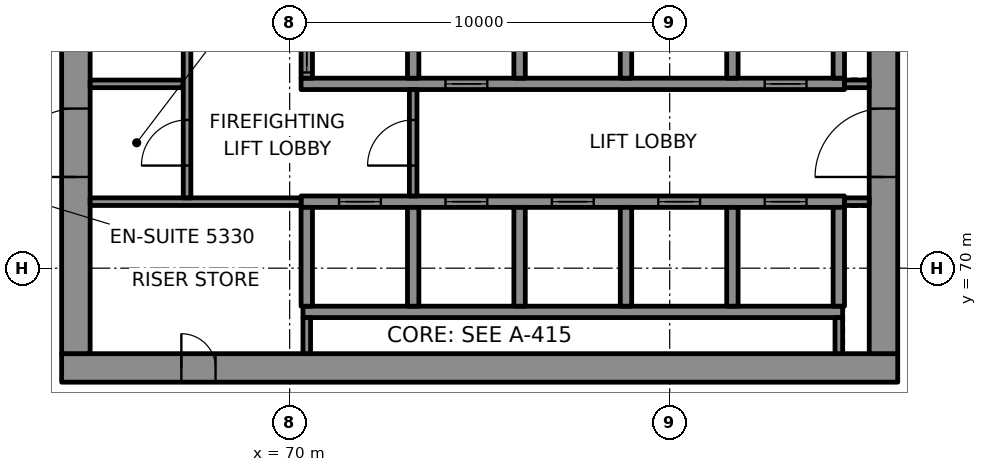
"""IFC4 building model, lengths in metres.
Left out: names, types, materials, properties, quantities, classifications, styles, units other than length and angle.
Written with IfcOpenShell. Run it as: python <this file> out.ifc"""

import sys

from ifc_helpers import new_model, si_unit, direction, frame, frame_2d, origin, place, context, subcontext, project, spatial, rectangle, extrude, element, fill, save


model = new_model("IFC4")
c1 = context("Model", 3, precision=1e-05, world=origin(), true_north=direction((0.0, 1.0)))
c2 = subcontext(c1, "Body", "Model", "MODEL_VIEW")
j1 = project(units=[si_unit("LENGTHUNIT", "METRE"), si_unit("PLANEANGLEUNIT", "RADIAN")], contexts=[c1])
p1 = place(None, origin())
s1 = spatial("IfcSite", under=j1, at=p1, CompositionType="ELEMENT")
p2 = place(p1, origin())
s2 = spatial("IfcBuilding", under=s1, at=p2, CompositionType="ELEMENT")
p3 = place(p2, frame((0.0, 0.0, 226.0)))
s3 = spatial("IfcBuildingStorey", under=s2, at=p3, CompositionType="ELEMENT", Elevation=226.0)
p4 = place(p3, frame((64.0, 67.375, 0.0), z_axis=(0.0, 0.0, 1.0), x_axis=(1.0, 0.0, 0.0)))
e1 = element("IfcWall", 1, at=p4, inside=s3, PredefinedType="SHEAR", context=c2, shape_type="SweptSolid", body=[
    extrude(rectangle(XDim=22.0, YDim=0.75, at=frame_2d((11.0, 0.0))), origin(), (0.0, 0.0, 1.0), 3.7),
])
p5 = place(p4, frame((3.15, 0.0, 0.0)))
e2 = element("IfcOpeningElement", 2, at=p5, cuts=e1, PredefinedType="OPENING", context=c2, shape_type="SweptSolid", body=[
    extrude(rectangle(XDim=0.9, YDim=2.1, at=frame_2d((0.45, 1.05))), frame((0.0, 0.385, 0.0), z_axis=(0.0, -1.0, 0.0), x_axis=(1.0, 0.0, 0.0)), (0.0, 0.0, 1.0), 0.77),
])
p6 = place(p3, frame((64.375, 67.75, 0.0), z_axis=(0.0, 0.0, 1.0), x_axis=(0.0, 1.0, 0.0)))
e3 = element("IfcWall", 3, at=p6, inside=s3, PredefinedType="SHEAR", context=c2, shape_type="SweptSolid", body=[
    extrude(rectangle(XDim=14.5, YDim=0.75, at=frame_2d((7.25, 0.0))), origin(), (0.0, 0.0, 1.0), 3.7),
])
p7 = place(p6, frame((4.65, 0.0, 0.0)))
e4 = element("IfcOpeningElement", 4, at=p7, cuts=e3, PredefinedType="OPENING", context=c2, shape_type="SweptSolid", body=[
    extrude(rectangle(XDim=1.8, YDim=2.1, at=frame_2d((0.9, 1.05))), frame((0.0, 0.385, 0.0), z_axis=(0.0, -1.0, 0.0), x_axis=(1.0, 0.0, 0.0)), (0.0, 0.0, 1.0), 0.77),
])
p8 = place(p6, frame((8.5, 0.0, 0.0)))
e5 = element("IfcOpeningElement", 5, at=p8, cuts=e3, PredefinedType="OPENING", context=c2, shape_type="SweptSolid", body=[
    extrude(rectangle(XDim=0.9, YDim=2.1, at=frame_2d((0.45, 1.05))), frame((0.0, 0.385, 0.0), z_axis=(0.0, -1.0, 0.0), x_axis=(1.0, 0.0, 0.0)), (0.0, 0.0, 1.0), 0.77),
])
p9 = place(p6, frame((12.2, 0.0, 0.0)))
e6 = element("IfcOpeningElement", 6, at=p9, cuts=e3, PredefinedType="OPENING", context=c2, shape_type="SweptSolid", body=[
    extrude(rectangle(XDim=0.9, YDim=2.1, at=frame_2d((0.45, 1.05))), frame((0.0, 0.385, 0.0), z_axis=(0.0, -1.0, 0.0), x_axis=(1.0, 0.0, 0.0)), (0.0, 0.0, 1.0), 0.77),
])
p10 = place(p3, frame((85.625, 67.75, 0.0), z_axis=(0.0, 0.0, 1.0), x_axis=(0.0, 1.0, 0.0)))
e7 = element("IfcWall", 7, at=p10, inside=s3, PredefinedType="SHEAR", context=c2, shape_type="SweptSolid", body=[
    extrude(rectangle(XDim=14.5, YDim=0.75, at=frame_2d((7.25, 0.0))), origin(), (0.0, 0.0, 1.0), 3.7),
])
p11 = place(p10, frame((4.65, 0.0, 0.0)))
e8 = element("IfcOpeningElement", 8, at=p11, cuts=e7, PredefinedType="OPENING", context=c2, shape_type="SweptSolid", body=[
    extrude(rectangle(XDim=1.8, YDim=2.1, at=frame_2d((0.9, 1.05))), frame((0.0, 0.385, 0.0), z_axis=(0.0, -1.0, 0.0), x_axis=(1.0, 0.0, 0.0)), (0.0, 0.0, 1.0), 0.77),
])
p12 = place(p10, frame((11.8, 0.0, 0.0)))
e9 = element("IfcOpeningElement", 9, at=p12, cuts=e7, PredefinedType="OPENING", context=c2, shape_type="SweptSolid", body=[
    extrude(rectangle(XDim=0.9, YDim=2.1, at=frame_2d((0.45, 1.05))), frame((0.0, 0.385, 0.0), z_axis=(0.0, -1.0, 0.0), x_axis=(1.0, 0.0, 0.0)), (0.0, 0.0, 1.0), 0.77),
])
p13 = place(p3, frame((70.35, 68.85, 0.0), z_axis=(0.0, 0.0, 1.0), x_axis=(1.0, 0.0, 0.0)))
e10 = element("IfcWall", 10, at=p13, inside=s3, PredefinedType="SHEAR", context=c2, shape_type="SweptSolid", body=[
    extrude(rectangle(XDim=14.2, YDim=0.3, at=frame_2d((7.1, 0.0))), origin(), (0.0, 0.0, 1.0), 3.7),
])
p14 = place(p3, frame((70.3, 71.75, 0.0), z_axis=(0.0, 0.0, 1.0), x_axis=(1.0, 0.0, 0.0)))
e11 = element("IfcWall", 11, at=p14, inside=s3, PredefinedType="SHEAR", context=c2, shape_type="SweptSolid", body=[
    extrude(rectangle(XDim=14.3, YDim=0.3, at=frame_2d((7.15, 0.0))), origin(), (0.0, 0.0, 1.0), 3.7),
])
p15 = place(p14, frame((1.0, 0.0, 0.0)))
e12 = element("IfcOpeningElement", 12, at=p15, cuts=e11, PredefinedType="OPENING", context=c2, shape_type="SweptSolid", body=[
    extrude(rectangle(XDim=1.1, YDim=2.1, at=frame_2d((0.55, 1.05))), frame((0.0, 0.16, 0.0), z_axis=(0.0, -1.0, 0.0), x_axis=(1.0, 0.0, 0.0)), (0.0, 0.0, 1.0), 0.32),
])
p16 = place(p14, frame((3.8, 0.0, 0.0)))
e13 = element("IfcOpeningElement", 13, at=p16, cuts=e11, PredefinedType="OPENING", context=c2, shape_type="SweptSolid", body=[
    extrude(rectangle(XDim=1.1, YDim=2.1, at=frame_2d((0.55, 1.05))), frame((0.0, 0.16, 0.0), z_axis=(0.0, -1.0, 0.0), x_axis=(1.0, 0.0, 0.0)), (0.0, 0.0, 1.0), 0.32),
])
p17 = place(p14, frame((6.6, 0.0, 0.0)))
e14 = element("IfcOpeningElement", 14, at=p17, cuts=e11, PredefinedType="OPENING", context=c2, shape_type="SweptSolid", body=[
    extrude(rectangle(XDim=1.1, YDim=2.1, at=frame_2d((0.55, 1.05))), frame((0.0, 0.16, 0.0), z_axis=(0.0, -1.0, 0.0), x_axis=(1.0, 0.0, 0.0)), (0.0, 0.0, 1.0), 0.32),
])
p18 = place(p14, frame((9.4, 0.0, 0.0)))
e15 = element("IfcOpeningElement", 15, at=p18, cuts=e11, PredefinedType="OPENING", context=c2, shape_type="SweptSolid", body=[
    extrude(rectangle(XDim=1.1, YDim=2.1, at=frame_2d((0.55, 1.05))), frame((0.0, 0.16, 0.0), z_axis=(0.0, -1.0, 0.0), x_axis=(1.0, 0.0, 0.0)), (0.0, 0.0, 1.0), 0.32),
])
p19 = place(p14, frame((12.2, 0.0, 0.0)))
e16 = element("IfcOpeningElement", 16, at=p19, cuts=e11, PredefinedType="OPENING", context=c2, shape_type="SweptSolid", body=[
    extrude(rectangle(XDim=1.1, YDim=2.1, at=frame_2d((0.55, 1.05))), frame((0.0, 0.16, 0.0), z_axis=(0.0, -1.0, 0.0), x_axis=(1.0, 0.0, 0.0)), (0.0, 0.0, 1.0), 0.32),
])
p20 = place(p3, frame((70.3, 74.85, 0.0), z_axis=(0.0, 0.0, 1.0), x_axis=(1.0, 0.0, 0.0)))
e17 = element("IfcWall", 17, at=p20, inside=s3, PredefinedType="SHEAR", context=c2, shape_type="SweptSolid", body=[
    extrude(rectangle(XDim=14.3, YDim=0.3, at=frame_2d((7.15, 0.0))), origin(), (0.0, 0.0, 1.0), 3.7),
])
p21 = place(p20, frame((3.8, 0.0, 0.0)))
e18 = element("IfcOpeningElement", 18, at=p21, cuts=e17, PredefinedType="OPENING", context=c2, shape_type="SweptSolid", body=[
    extrude(rectangle(XDim=1.1, YDim=2.1, at=frame_2d((0.55, 1.05))), frame((0.0, 0.16, 0.0), z_axis=(0.0, -1.0, 0.0), x_axis=(1.0, 0.0, 0.0)), (0.0, 0.0, 1.0), 0.32),
])
p22 = place(p20, frame((12.2, 0.0, 0.0)))
e19 = element("IfcOpeningElement", 19, at=p22, cuts=e17, PredefinedType="OPENING", context=c2, shape_type="SweptSolid", body=[
    extrude(rectangle(XDim=1.1, YDim=2.1, at=frame_2d((0.55, 1.05))), frame((0.0, 0.16, 0.0), z_axis=(0.0, -1.0, 0.0), x_axis=(1.0, 0.0, 0.0)), (0.0, 0.0, 1.0), 0.32),
])
p23 = place(p3, frame((70.45, 69.0, 0.0), z_axis=(0.0, 0.0, 1.0), x_axis=(0.0, 1.0, 0.0)))
e20 = element("IfcWall", 20, at=p23, inside=s3, PredefinedType="SHEAR", context=c2, shape_type="SweptSolid", body=[
    extrude(rectangle(XDim=2.6, YDim=0.3, at=frame_2d((1.3, 0.0))), origin(), (0.0, 0.0, 1.0), 3.7),
])
p24 = place(p3, frame((70.45, 75.0, 0.0), z_axis=(0.0, 0.0, 1.0), x_axis=(0.0, 1.0, 0.0)))
e21 = element("IfcWall", 21, at=p24, inside=s3, PredefinedType="SHEAR", context=c2, shape_type="SweptSolid", body=[
    extrude(rectangle(XDim=2.6, YDim=0.3, at=frame_2d((1.3, 0.0))), origin(), (0.0, 0.0, 1.0), 3.7),
])
p25 = place(p24, frame((0.15, 0.0, 0.0)))
e22 = element("IfcOpeningElement", 22, at=p25, cuts=e21, PredefinedType="OPENING", context=c2, shape_type="SweptSolid", body=[
    extrude(rectangle(XDim=1.1, YDim=2.1, at=frame_2d((0.55, 1.05))), frame((0.0, 0.16, 0.0), z_axis=(0.0, -1.0, 0.0), x_axis=(1.0, 0.0, 0.0)), (0.0, 0.0, 1.0), 0.32),
])
for number, where, z_axis, x_axis in (
    (23, (73.25, 69.0, 0.0), (0.0, 0.0, 1.0), (0.0, 1.0, 0.0)),
    (24, (73.25, 75.0, 0.0), (0.0, 0.0, 1.0), (0.0, 1.0, 0.0)),
    (25, (76.05, 69.0, 0.0), (0.0, 0.0, 1.0), (0.0, 1.0, 0.0)),
    (26, (76.05, 75.0, 0.0), (0.0, 0.0, 1.0), (0.0, 1.0, 0.0)),
    (27, (78.85, 69.0, 0.0), (0.0, 0.0, 1.0), (0.0, 1.0, 0.0)),
    (28, (78.85, 75.0, 0.0), (0.0, 0.0, 1.0), (0.0, 1.0, 0.0)),
    (29, (81.65, 69.0, 0.0), (0.0, 0.0, 1.0), (0.0, 1.0, 0.0)),
    (30, (81.65, 75.0, 0.0), (0.0, 0.0, 1.0), (0.0, 1.0, 0.0)),
    (31, (84.45, 69.0, 0.0), (0.0, 0.0, 1.0), (0.0, 1.0, 0.0)),
    (32, (84.45, 75.0, 0.0), (0.0, 0.0, 1.0), (0.0, 1.0, 0.0)),
):
    element("IfcWall", number, at=place(p3, frame(where, z_axis=z_axis, x_axis=x_axis)), inside=s3, PredefinedType="SHEAR", context=c2, shape_type="SweptSolid", body=[
        extrude(rectangle(XDim=2.6, YDim=0.3, at=frame_2d((1.3, 0.0))), origin(), (0.0, 0.0, 1.0), 3.7),
    ])
p26 = place(p3, frame((64.75, 71.75, 0.0), z_axis=(0.0, 0.0, 1.0), x_axis=(1.0, 0.0, 0.0)))
e33 = element("IfcWall", 33, at=p26, inside=s3, PredefinedType="PARTITIONING", context=c2, shape_type="SweptSolid", body=[
    extrude(rectangle(XDim=5.55, YDim=0.2, at=frame_2d((2.775, 0.0))), origin(), (0.0, 0.0, 1.0), 3.7),
])
p27 = place(p3, frame((84.6, 71.75, 0.0), z_axis=(0.0, 0.0, 1.0), x_axis=(1.0, 0.0, 0.0)))
e34 = element("IfcWall", 34, at=p27, inside=s3, PredefinedType="PARTITIONING", context=c2, shape_type="SweptSolid", body=[
    extrude(rectangle(XDim=0.65, YDim=0.2, at=frame_2d((0.325, 0.0))), origin(), (0.0, 0.0, 1.0), 3.7),
])
p28 = place(p3, frame((64.75, 74.85, 0.0), z_axis=(0.0, 0.0, 1.0), x_axis=(1.0, 0.0, 0.0)))
e35 = element("IfcWall", 35, at=p28, inside=s3, PredefinedType="PARTITIONING", context=c2, shape_type="SweptSolid", body=[
    extrude(rectangle(XDim=2.45, YDim=0.2, at=frame_2d((1.225, 0.0))), origin(), (0.0, 0.0, 1.0), 3.7),
])
p29 = place(p3, frame((84.6, 74.85, 0.0), z_axis=(0.0, 0.0, 1.0), x_axis=(1.0, 0.0, 0.0)))
e36 = element("IfcWall", 36, at=p29, inside=s3, PredefinedType="PARTITIONING", context=c2, shape_type="SweptSolid", body=[
    extrude(rectangle(XDim=0.65, YDim=0.2, at=frame_2d((0.325, 0.0))), origin(), (0.0, 0.0, 1.0), 3.7),
])
p30 = place(p3, frame((67.3, 71.85, 0.0), z_axis=(0.0, 0.0, 1.0), x_axis=(0.0, 1.0, 0.0)))
e37 = element("IfcWall", 37, at=p30, inside=s3, PredefinedType="PARTITIONING", context=c2, shape_type="SweptSolid", body=[
    extrude(rectangle(XDim=5.75, YDim=0.2, at=frame_2d((2.875, 0.0))), origin(), (0.0, 0.0, 1.0), 3.7),
])
p31 = place(p30, frame((0.85, 0.0, 0.0)))
e38 = element("IfcOpeningElement", 38, at=p31, cuts=e37, PredefinedType="OPENING", context=c2, shape_type="SweptSolid", body=[
    extrude(rectangle(XDim=1.2, YDim=2.1, at=frame_2d((0.6, 1.05))), frame((0.0, 0.11, 0.0), z_axis=(0.0, -1.0, 0.0), x_axis=(1.0, 0.0, 0.0)), (0.0, 0.0, 1.0), 0.22),
])
p32 = place(p3, frame((70.45, 67.75, 0.0), z_axis=(0.0, 0.0, 1.0), x_axis=(0.0, 1.0, 0.0)))
e39 = element("IfcWall", 39, at=p32, inside=s3, PredefinedType="PARTITIONING", context=c2, shape_type="SweptSolid", body=[
    extrude(rectangle(XDim=0.95, YDim=0.2, at=frame_2d((0.475, 0.0))), origin(), (0.0, 0.0, 1.0), 3.7),
])
p33 = place(p3, frame((73.25, 71.9, 0.0), z_axis=(0.0, 0.0, 1.0), x_axis=(0.0, 1.0, 0.0)))
e40 = element("IfcWall", 40, at=p33, inside=s3, PredefinedType="PARTITIONING", context=c2, shape_type="SweptSolid", body=[
    extrude(rectangle(XDim=2.8, YDim=0.2, at=frame_2d((1.4, 0.0))), origin(), (0.0, 0.0, 1.0), 3.7),
])
p34 = place(p33, frame((0.8, 0.0, 0.0)))
e41 = element("IfcOpeningElement", 41, at=p34, cuts=e40, PredefinedType="OPENING", context=c2, shape_type="SweptSolid", body=[
    extrude(rectangle(XDim=1.2, YDim=2.1, at=frame_2d((0.6, 1.05))), frame((0.0, 0.11, 0.0), z_axis=(0.0, -1.0, 0.0), x_axis=(1.0, 0.0, 0.0)), (0.0, 0.0, 1.0), 0.22),
])
p35 = place(p3, frame((84.45, 67.75, 0.0), z_axis=(0.0, 0.0, 1.0), x_axis=(0.0, 1.0, 0.0)))
e42 = element("IfcWall", 42, at=p35, inside=s3, PredefinedType="PARTITIONING", context=c2, shape_type="SweptSolid", body=[
    extrude(rectangle(XDim=0.95, YDim=0.2, at=frame_2d((0.475, 0.0))), origin(), (0.0, 0.0, 1.0), 3.7),
])
p36 = place(p15, origin())
e43 = element("IfcDoor", 43, at=p36, inside=s3, OperationType="DOUBLE_DOOR_SLIDING", PredefinedType="DOOR", context=c2, shape_type="SweptSolid", body=[
    extrude(rectangle(XDim=1.1, YDim=2.1, at=frame_2d((0.55, 1.05))), frame((0.0, 0.025, 0.0), z_axis=(0.0, -1.0, 0.0), x_axis=(1.0, 0.0, 0.0)), (0.0, 0.0, 1.0), 0.05),
])
fill(e12, e43)
p37 = place(p16, origin())
e44 = element("IfcDoor", 44, at=p37, inside=s3, OperationType="DOUBLE_DOOR_SLIDING", PredefinedType="DOOR", context=c2, shape_type="SweptSolid", body=[
    extrude(rectangle(XDim=1.1, YDim=2.1, at=frame_2d((0.55, 1.05))), frame((0.0, 0.025, 0.0), z_axis=(0.0, -1.0, 0.0), x_axis=(1.0, 0.0, 0.0)), (0.0, 0.0, 1.0), 0.05),
])
fill(e13, e44)
p38 = place(p17, origin())
e45 = element("IfcDoor", 45, at=p38, inside=s3, OperationType="DOUBLE_DOOR_SLIDING", PredefinedType="DOOR", context=c2, shape_type="SweptSolid", body=[
    extrude(rectangle(XDim=1.1, YDim=2.1, at=frame_2d((0.55, 1.05))), frame((0.0, 0.025, 0.0), z_axis=(0.0, -1.0, 0.0), x_axis=(1.0, 0.0, 0.0)), (0.0, 0.0, 1.0), 0.05),
])
fill(e14, e45)
p39 = place(p18, origin())
e46 = element("IfcDoor", 46, at=p39, inside=s3, OperationType="DOUBLE_DOOR_SLIDING", PredefinedType="DOOR", context=c2, shape_type="SweptSolid", body=[
    extrude(rectangle(XDim=1.1, YDim=2.1, at=frame_2d((0.55, 1.05))), frame((0.0, 0.025, 0.0), z_axis=(0.0, -1.0, 0.0), x_axis=(1.0, 0.0, 0.0)), (0.0, 0.0, 1.0), 0.05),
])
fill(e15, e46)
p40 = place(p19, origin())
e47 = element("IfcDoor", 47, at=p40, inside=s3, OperationType="DOUBLE_DOOR_SLIDING", PredefinedType="DOOR", context=c2, shape_type="SweptSolid", body=[
    extrude(rectangle(XDim=1.1, YDim=2.1, at=frame_2d((0.55, 1.05))), frame((0.0, 0.025, 0.0), z_axis=(0.0, -1.0, 0.0), x_axis=(1.0, 0.0, 0.0)), (0.0, 0.0, 1.0), 0.05),
])
fill(e16, e47)
p41 = place(p25, origin())
e48 = element("IfcDoor", 48, at=p41, inside=s3, OperationType="DOUBLE_DOOR_SLIDING", PredefinedType="DOOR", context=c2, shape_type="SweptSolid", body=[
    extrude(rectangle(XDim=1.1, YDim=2.1, at=frame_2d((0.55, 1.05))), frame((0.0, 0.025, 0.0), z_axis=(0.0, -1.0, 0.0), x_axis=(1.0, 0.0, 0.0)), (0.0, 0.0, 1.0), 0.05),
])
fill(e22, e48)
p42 = place(p21, origin())
e49 = element("IfcDoor", 49, at=p42, inside=s3, OperationType="DOUBLE_DOOR_SLIDING", PredefinedType="DOOR", context=c2, shape_type="SweptSolid", body=[
    extrude(rectangle(XDim=1.1, YDim=2.1, at=frame_2d((0.55, 1.05))), frame((0.0, 0.025, 0.0), z_axis=(0.0, -1.0, 0.0), x_axis=(1.0, 0.0, 0.0)), (0.0, 0.0, 1.0), 0.05),
])
fill(e18, e49)
p43 = place(p22, origin())
e50 = element("IfcDoor", 50, at=p43, inside=s3, OperationType="DOUBLE_DOOR_SLIDING", PredefinedType="DOOR", context=c2, shape_type="SweptSolid", body=[
    extrude(rectangle(XDim=1.1, YDim=2.1, at=frame_2d((0.55, 1.05))), frame((0.0, 0.025, 0.0), z_axis=(0.0, -1.0, 0.0), x_axis=(1.0, 0.0, 0.0)), (0.0, 0.0, 1.0), 0.05),
])
fill(e19, e50)
p44 = place(p34, origin())
e51 = element("IfcDoor", 51, at=p44, inside=s3, OperationType="SINGLE_SWING_LEFT", PredefinedType="DOOR", context=c2, shape_type="SweptSolid", body=[
    extrude(rectangle(XDim=1.2, YDim=2.1, at=frame_2d((0.6, 1.05))), frame((0.0, 0.025, 0.0), z_axis=(0.0, -1.0, 0.0), x_axis=(1.0, 0.0, 0.0)), (0.0, 0.0, 1.0), 0.05),
])
fill(e41, e51)
p45 = place(p31, origin())
e52 = element("IfcDoor", 52, at=p45, inside=s3, OperationType="SINGLE_SWING_RIGHT", PredefinedType="DOOR", context=c2, shape_type="SweptSolid", body=[
    extrude(rectangle(XDim=1.2, YDim=2.1, at=frame_2d((0.6, 1.05))), frame((0.0, 0.025, 0.0), z_axis=(0.0, -1.0, 0.0), x_axis=(1.0, 0.0, 0.0)), (0.0, 0.0, 1.0), 0.05),
])
fill(e38, e52)
p46 = place(p7, origin())
e53 = element("IfcDoor", 53, at=p46, inside=s3, OperationType="SINGLE_SWING_LEFT", PredefinedType="DOOR", context=c2, shape_type="SweptSolid", body=[
    extrude(rectangle(XDim=1.8, YDim=2.1, at=frame_2d((0.9, 1.05))), frame((0.0, 0.095, 0.0), z_axis=(0.0, -1.0, 0.0), x_axis=(1.0, 0.0, 0.0)), (0.0, 0.0, 1.0), 0.19),
])
fill(e4, e53)
p47 = place(p11, origin())
e54 = element("IfcDoor", 54, at=p47, inside=s3, OperationType="SINGLE_SWING_RIGHT", PredefinedType="DOOR", context=c2, shape_type="SweptSolid", body=[
    extrude(rectangle(XDim=1.8, YDim=2.1, at=frame_2d((0.9, 1.05))), frame((0.0, 0.095, 0.0), z_axis=(0.0, -1.0, 0.0), x_axis=(1.0, 0.0, 0.0)), (0.0, 0.0, 1.0), 0.19),
])
fill(e8, e54)
p48 = place(p5, origin())
e55 = element("IfcDoor", 55, at=p48, inside=s3, OperationType="SINGLE_SWING_LEFT", PredefinedType="DOOR", context=c2, shape_type="SweptSolid", body=[
    extrude(rectangle(XDim=0.9, YDim=2.1, at=frame_2d((0.45, 1.05))), frame((0.0, 0.095, 0.0), z_axis=(0.0, -1.0, 0.0), x_axis=(1.0, 0.0, 0.0)), (0.0, 0.0, 1.0), 0.19),
])
fill(e2, e55)
save(model, sys.argv[1])
